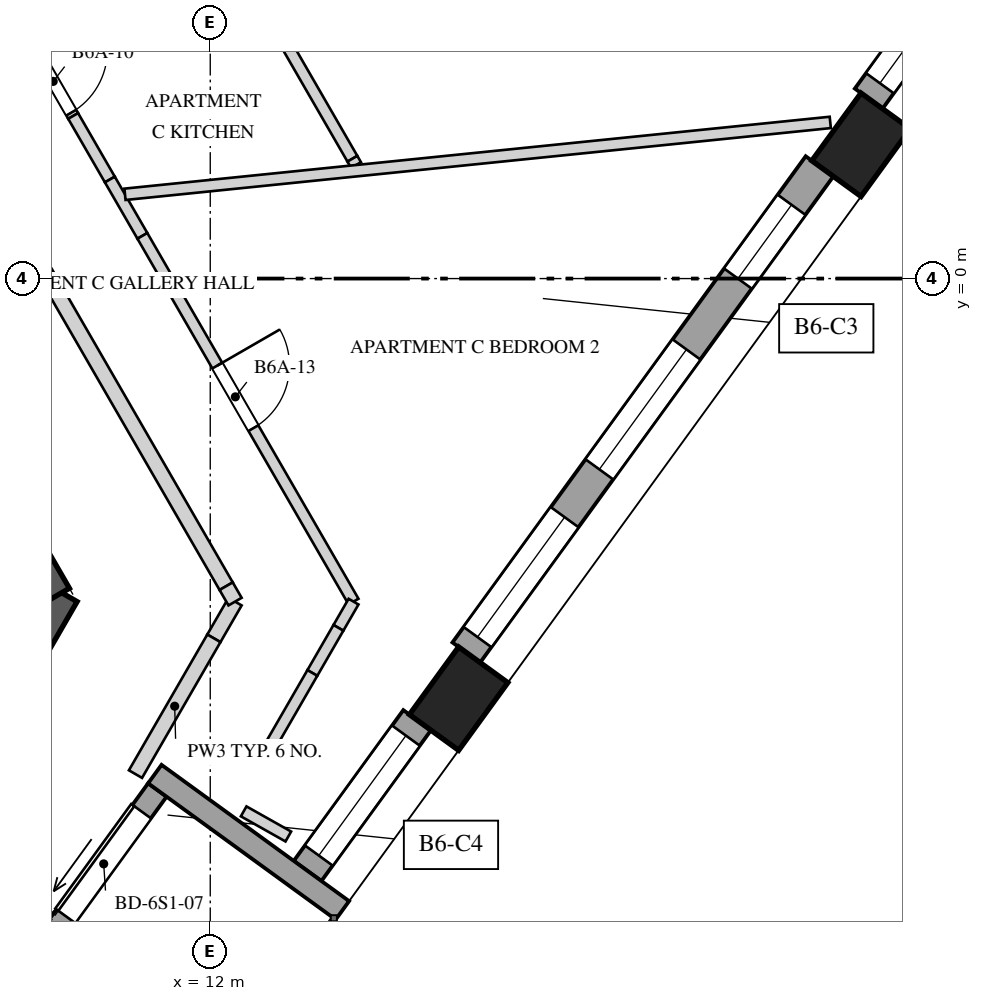
"""IFC4 building model, lengths in metres.
Left out: names, types, materials, properties, quantities, classifications, styles, units other than length and angle.
Written with IfcOpenShell. Run it as: python <this file> out.ifc"""

import sys

from ifc_helpers import new_model, si_unit, direction, frame, frame_2d, origin, origin_2d, place, context, subcontext, project, spatial, polyline, rectangle, outline, extrude, element, fill, save


model = new_model("IFC4")
c1 = context("Model", 3, precision=1e-05, world=origin(), true_north=direction((0.0, 1.0)))
c2 = subcontext(c1, "Body", "Model", "MODEL_VIEW")
j1 = project(units=[si_unit("LENGTHUNIT", "METRE"), si_unit("PLANEANGLEUNIT", "RADIAN")], contexts=[c1])
p1 = place(None, origin())
s1 = spatial("IfcSite", under=j1, at=p1, CompositionType="ELEMENT")
p2 = place(p1, origin())
s2 = spatial("IfcBuilding", under=s1, at=p2, CompositionType="ELEMENT")
p3 = place(p2, frame((0.0, 0.0, 241.2)))
s3 = spatial("IfcBuildingStorey", under=s2, at=p3, CompositionType="ELEMENT", Elevation=241.2)
p4 = place(p3, frame((8.501, -6.575, 0.0), z_axis=(0.0, 0.0, 1.0), x_axis=(0.499995765644, 0.866027848477, 0.0)))
e1 = element("IfcWall", 1, at=p4, inside=s3, PredefinedType="SHEAR", context=c2, shape_type="SweptSolid", body=[
    extrude(rectangle(XDim=2.887, YDim=0.7, at=frame_2d((1.443, 0.0))), origin(), (0.0, 0.0, 1.0), 4.0),
])
p5 = place(p3, frame((9.844, -4.25, 0.0), z_axis=(0.0, 0.0, 1.0), x_axis=(-0.500003331888, 0.866023480109, 0.0)))
e2 = element("IfcWall", 2, at=p5, inside=s3, PredefinedType="SHEAR", context=c2, shape_type="SweptSolid", body=[
    extrude(rectangle(XDim=17.205, YDim=0.7, at=frame_2d((8.603, 0.0))), origin(), (0.0, 0.0, 1.0), 4.0),
])
p6 = place(p5, frame((6.877, 0.0, 0.0)))
e3 = element("IfcOpeningElement", 3, at=p6, cuts=e2, PredefinedType="OPENING", context=c2, shape_type="SweptSolid", body=[
    extrude(rectangle(XDim=1.0, YDim=2.4, at=frame_2d((0.5, 1.2))), frame((0.0, 0.36, 0.0), z_axis=(0.0, -1.0, 0.0), x_axis=(1.0, 0.0, 0.0)), (0.0, 0.0, 1.0), 0.72),
])
for number, where, z_axis, x_axis in (
    (4, (15.268, -5.526, 0.0), (0.0, 0.0, 1.0), (0.588, 0.809, 0.0)),
    (5, (20.562, 1.76, 0.0), (0.0, 0.0, 1.0), (0.588, 0.809, 0.0)),
):
    element("IfcColumn", number, at=place(p3, frame(where, z_axis=z_axis, x_axis=x_axis)), inside=s3, PredefinedType="COLUMN", context=c2, shape_type="SweptSolid", body=[
        extrude(rectangle(XDim=1.1, YDim=0.8, at=origin_2d()), origin(), (0.0, 0.0, 1.0), 4.0),
    ])
p7 = place(p3, frame((13.281, -7.793, 0.0), z_axis=(0.0, 0.0, 1.0), x_axis=(0.587792773076, 0.809011530152, 0.0)))
e6 = element("IfcWall", 6, at=p7, inside=s3, PredefinedType="SOLIDWALL", context=c2, shape_type="SweptSolid", body=[
    extrude(rectangle(XDim=2.452, YDim=0.45, at=frame_2d((1.226, 0.0))), origin(), (0.0, 0.0, 1.0), 3.3),
])
p8 = place(p7, frame((0.251, 0.0, 0.4)))
e7 = element("IfcOpeningElement", 7, at=p8, cuts=e6, PredefinedType="OPENING", context=c2, shape_type="SweptSolid", body=[
    extrude(rectangle(XDim=1.95, YDim=2.75, at=frame_2d((0.975, 1.375))), frame((0.0, 0.235, 0.0), z_axis=(0.0, -1.0, 0.0), x_axis=(1.0, 0.0, 0.0)), (0.0, 0.0, 1.0), 0.47),
])
p9 = place(p3, frame((15.368, -4.92, 0.0), z_axis=(0.0, 0.0, 1.0), x_axis=(0.587782407267, 0.809019061399, 0.0)))
e8 = element("IfcWall", 8, at=p9, inside=s3, PredefinedType="SOLIDWALL", context=c2, shape_type="SweptSolid", body=[
    extrude(rectangle(XDim=7.907, YDim=0.45, at=frame_2d((3.953, 0.0))), origin(), (0.0, 0.0, 1.0), 3.3),
])
p10 = place(p9, frame((0.251, 0.0, 0.4)))
e9 = element("IfcOpeningElement", 9, at=p10, cuts=e8, PredefinedType="OPENING", context=c2, shape_type="SweptSolid", body=[
    extrude(rectangle(XDim=1.95, YDim=2.75, at=frame_2d((0.975, 1.375))), frame((0.0, 0.235, 0.0), z_axis=(0.0, -1.0, 0.0), x_axis=(1.0, 0.0, 0.0)), (0.0, 0.0, 1.0), 0.47),
])
p11 = place(p9, frame((2.978, 0.0, 0.4)))
e10 = element("IfcOpeningElement", 10, at=p11, cuts=e8, PredefinedType="OPENING", context=c2, shape_type="SweptSolid", body=[
    extrude(rectangle(XDim=1.95, YDim=2.75, at=frame_2d((0.975, 1.375))), frame((0.0, 0.235, 0.0), z_axis=(0.0, -1.0, 0.0), x_axis=(1.0, 0.0, 0.0)), (0.0, 0.0, 1.0), 0.47),
])
p12 = place(p9, frame((6.081, 0.0, 0.4)))
e11 = element("IfcOpeningElement", 11, at=p12, cuts=e8, PredefinedType="OPENING", context=c2, shape_type="SweptSolid", body=[
    extrude(rectangle(XDim=1.2, YDim=2.75, at=frame_2d((0.6, 1.375))), frame((0.0, 0.235, 0.0), z_axis=(0.0, -1.0, 0.0), x_axis=(1.0, 0.0, 0.0)), (0.0, 0.0, 1.0), 0.47),
])
p13 = place(p3, frame((20.662, 2.367, 0.0), z_axis=(0.0, 0.0, 1.0), x_axis=(0.587792773076, 0.809011530152, 0.0)))
e12 = element("IfcWall", 12, at=p13, inside=s3, PredefinedType="SOLIDWALL", context=c2, shape_type="SweptSolid", body=[
    extrude(rectangle(XDim=2.452, YDim=0.45, at=frame_2d((1.226, 0.0))), origin(), (0.0, 0.0, 1.0), 3.3),
])
p14 = place(p13, frame((0.251, 0.0, 0.4)))
e13 = element("IfcOpeningElement", 13, at=p14, cuts=e12, PredefinedType="OPENING", context=c2, shape_type="SweptSolid", body=[
    extrude(rectangle(XDim=1.95, YDim=2.75, at=frame_2d((0.975, 1.375))), frame((0.0, 0.235, 0.0), z_axis=(0.0, -1.0, 0.0), x_axis=(1.0, 0.0, 0.0)), (0.0, 0.0, 1.0), 0.47),
])
p15 = place(p3, frame((9.892, -8.672, 0.0), z_axis=(0.0, 0.0, 1.0), x_axis=(0.587833242688, 0.808982125137, 0.0)))
e14 = element("IfcWall", 14, at=p15, inside=s3, PredefinedType="SOLIDWALL", context=c2, shape_type="SweptSolid", body=[
    extrude(rectangle(XDim=2.402, YDim=0.3, at=frame_2d((1.201, 0.0))), origin(), (0.0, 0.0, 1.0), 3.3),
])
p16 = place(p15, frame((0.351, 0.0, 0.0)))
e15 = element("IfcOpeningElement", 15, at=p16, cuts=e14, PredefinedType="OPENING", context=c2, shape_type="SweptSolid", body=[
    extrude(rectangle(XDim=1.7, YDim=2.5, at=frame_2d((0.85, 1.25))), frame((0.0, 0.16, 0.0), z_axis=(0.0, -1.0, 0.0), x_axis=(1.0, 0.0, 0.0)), (0.0, 0.0, 1.0), 0.32),
])
p17 = place(p3, frame((13.739, -8.312, 0.0), z_axis=(0.0, 0.0, 1.0), x_axis=(-0.80902328748, 0.587776590479, 0.0)))
e16 = element("IfcWall", 16, at=p17, inside=s3, PredefinedType="SOLIDWALL", context=c2, shape_type="SweptSolid", body=[
    extrude(rectangle(XDim=3.05, YDim=0.3, at=frame_2d((1.525, 0.0))), origin(), (0.0, 0.0, 1.0), 3.3),
])
p18 = place(p3, frame((9.321, 3.655, 0.0), z_axis=(0.0, 0.0, 1.0), x_axis=(0.499980071345, -0.866036909293, 0.0)))
e17 = element("IfcWall", 17, at=p18, inside=s3, PredefinedType="PARTITIONING", context=c2, shape_type="SweptSolid", body=[
    extrude(outline(polyline([(0.0, 0.0), (1.75, 0.0), (1.75, 3.65), (0.892, 3.65), (0.892, 2.55), (0.0, 2.55), (0.0, 0.0)])), frame((0.0, 0.075, 0.0), z_axis=(0.0, -1.0, 0.0), x_axis=(1.0, 0.0, 0.0)), (0.0, 0.0, 1.0), 0.15),
])
p19 = place(p18, frame((0.75, 0.0, 0.0)))
e18 = element("IfcOpeningElement", 18, at=p19, cuts=e17, PredefinedType="OPENING", context=c2, shape_type="SweptSolid", body=[
    extrude(rectangle(XDim=0.95, YDim=2.4, at=frame_2d((0.475, 1.2))), frame((0.0, 0.085, 0.0), z_axis=(0.0, -1.0, 0.0), x_axis=(1.0, 0.0, 0.0)), (0.0, 0.0, 1.0), 0.17),
])
p20 = place(p3, frame((10.196, 2.139, 0.0), z_axis=(0.0, 0.0, 1.0), x_axis=(0.500109093648, -0.865962409375, 0.0)))
e19 = element("IfcWall", 19, at=p20, inside=s3, PredefinedType="PARTITIONING", context=c2, shape_type="SweptSolid", body=[
    extrude(rectangle(XDim=0.966, YDim=0.15, at=frame_2d((0.483, 0.0))), origin(), (0.0, 0.0, 1.0), 3.65),
])
p21 = place(p3, frame((10.679, 1.303, 0.0), z_axis=(0.0, 0.0, 1.0), x_axis=(0.500035209441, -0.86600507465, 0.0)))
e20 = element("IfcWall", 20, at=p21, inside=s3, PredefinedType="PARTITIONING", context=c2, shape_type="SweptSolid", body=[
    extrude(rectangle(XDim=0.856, YDim=0.15, at=frame_2d((0.428, 0.0))), origin(), (0.0, 0.0, 1.0), 2.75),
])
p22 = place(p3, frame((11.107, 0.562, 0.0), z_axis=(0.0, 0.0, 1.0), x_axis=(0.499981090573, -0.866036320872, 0.0)))
e21 = element("IfcWall", 21, at=p22, inside=s3, PredefinedType="PARTITIONING", context=c2, shape_type="SweptSolid", body=[
    extrude(rectangle(XDim=5.556, YDim=0.15, at=frame_2d((2.778, 0.0))), origin(), (0.0, 0.0, 1.0), 3.65),
])
p23 = place(p22, frame((1.971, 0.0, 0.0)))
e22 = element("IfcOpeningElement", 22, at=p23, cuts=e21, PredefinedType="OPENING", context=c2, shape_type="SweptSolid", body=[
    extrude(rectangle(XDim=0.95, YDim=2.4, at=frame_2d((0.475, 1.2))), frame((0.0, 0.085, 0.0), z_axis=(0.0, -1.0, 0.0), x_axis=(1.0, 0.0, 0.0)), (0.0, 0.0, 1.0), 0.17),
])
p24 = place(p3, frame((12.563, 3.84, 0.0), z_axis=(0.0, 0.0, 1.0), x_axis=(0.500016176693, -0.866016063965, 0.0)))
e23 = element("IfcWall", 23, at=p24, inside=s3, PredefinedType="PARTITIONING", context=c2, shape_type="SweptSolid", body=[
    extrude(rectangle(XDim=2.614, YDim=0.15, at=frame_2d((1.307, 0.0))), origin(), (0.0, 0.0, 1.0), 3.65),
])
p25 = place(p3, frame((13.87, 1.576, 0.0), z_axis=(0.0, 0.0, 1.0), x_axis=(0.49972245349, -0.866185586049, 0.0)))
e24 = element("IfcWall", 24, at=p25, inside=s3, PredefinedType="PARTITIONING", context=c2, shape_type="SweptSolid", body=[
    extrude(rectangle(XDim=0.095, YDim=0.15, at=frame_2d((0.048, 0.0))), origin(), (0.0, 0.0, 1.0), 2.75),
])
p26 = place(p3, frame((12.44, -7.009, 0.0), z_axis=(0.0, 0.0, 1.0), x_axis=(0.871323961853, -0.490708216256, 0.0)))
e25 = element("IfcWall", 25, at=p26, inside=s3, PredefinedType="PARTITIONING", context=c2, shape_type="SweptSolid", body=[
    extrude(rectangle(XDim=0.674, YDim=0.15, at=frame_2d((0.337, 0.0))), origin(), (0.0, 0.0, 1.0), 3.65),
])
p27 = place(p3, frame((13.885, -4.25, 0.0), z_axis=(0.0, 0.0, 1.0), x_axis=(-0.499899443193, -0.866083452501, 0.0)))
e26 = element("IfcWall", 26, at=p27, inside=s3, PredefinedType="PARTITIONING", context=c2, shape_type="SweptSolid", body=[
    extrude(rectangle(XDim=0.398, YDim=0.15, at=frame_2d((0.199, 0.0))), origin(), (0.0, 0.0, 1.0), 3.65),
])
p28 = place(p3, frame((13.686, -4.595, 0.0), z_axis=(0.0, 0.0, 1.0), x_axis=(-0.500081895979, -0.865978115955, 0.0)))
e27 = element("IfcWall", 27, at=p28, inside=s3, PredefinedType="PARTITIONING", context=c2, shape_type="SweptSolid", body=[
    extrude(rectangle(XDim=0.686, YDim=0.15, at=frame_2d((0.343, 0.0))), origin(), (0.0, 0.0, 1.0), 2.95),
])
p29 = place(p3, frame((13.343, -5.189, 0.0), z_axis=(0.0, 0.0, 1.0), x_axis=(-0.500009088543, -0.866020156448, 0.0)))
e28 = element("IfcWall", 28, at=p29, inside=s3, PredefinedType="PARTITIONING", context=c2, shape_type="SweptSolid", body=[
    extrude(rectangle(XDim=1.106, YDim=0.15, at=frame_2d((0.553, 0.0))), origin(), (0.0, 0.0, 1.0), 3.65),
])
p30 = place(p3, frame((20.157, 2.054, 0.0), z_axis=(0.0, 0.0, 1.0), x_axis=(-0.994848051669, -0.101377285871, 0.0)))
e29 = element("IfcWall", 29, at=p30, inside=s3, PredefinedType="PARTITIONING", context=c2, shape_type="SweptSolid", body=[
    extrude(rectangle(XDim=9.327, YDim=0.15, at=frame_2d((4.664, 0.0))), origin(), (0.0, 0.0, 1.0), 2.75),
])
p31 = place(p3, frame((12.326, -4.25, 0.0), z_axis=(0.0, 0.0, 1.0), x_axis=(-0.500000383388, -0.866025182435, 0.0)))
e30 = element("IfcWall", 30, at=p31, inside=s3, PredefinedType="SOLIDWALL", context=c2, shape_type="SweptSolid", body=[
    extrude(rectangle(XDim=0.558, YDim=0.2, at=frame_2d((0.279, 0.0))), origin(), (0.0, 0.0, 1.0), 2.95),
])
p32 = place(p3, frame((12.048, -4.733, 0.0), z_axis=(0.0, 0.0, 1.0), x_axis=(-0.499958106649, -0.866049589571, 0.0)))
e31 = element("IfcWall", 31, at=p32, inside=s3, PredefinedType="SOLIDWALL", context=c2, shape_type="SweptSolid", body=[
    extrude(rectangle(XDim=2.063, YDim=0.2, at=frame_2d((1.031, 0.0))), origin(), (0.0, 0.0, 1.0), 3.65),
])
p33 = place(p3, frame((9.629, 0.423, 0.0), z_axis=(0.0, 0.0, 1.0), x_axis=(0.499995433041, -0.866028040503, 0.0)))
e32 = element("IfcWall", 32, at=p33, inside=s3, PredefinedType="SOLIDWALL", context=c2, shape_type="SweptSolid", body=[
    extrude(rectangle(XDim=5.161, YDim=0.2, at=frame_2d((2.581, 0.0))), origin(), (0.0, 0.0, 1.0), 3.65),
])
p34 = place(p3, frame((12.209, -4.047, 0.0), z_axis=(0.0, 0.0, 1.0), x_axis=(0.49972245349, -0.866185586049, 0.0)))
e33 = element("IfcWall", 33, at=p34, inside=s3, PredefinedType="SOLIDWALL", context=c2, shape_type="SweptSolid", body=[
    extrude(rectangle(XDim=0.235, YDim=0.2, at=frame_2d((0.117, 0.0))), origin(), (0.0, 0.0, 1.0), 2.95),
])
p35 = place(p8, origin())
e34 = element("IfcWindow", 34, at=p35, inside=s3, PartitioningType="SINGLE_PANEL", PredefinedType="WINDOW", context=c2, shape_type="SweptSolid", body=[
    extrude(rectangle(XDim=1.95, YDim=2.75, at=frame_2d((0.975, 1.375))), frame((0.0, 0.03, 0.0), z_axis=(0.0, -1.0, 0.0), x_axis=(1.0, 0.0, 0.0)), (0.0, 0.0, 1.0), 0.06),
])
fill(e7, e34)
p36 = place(p10, origin())
e35 = element("IfcWindow", 35, at=p36, inside=s3, PartitioningType="SINGLE_PANEL", PredefinedType="WINDOW", context=c2, shape_type="SweptSolid", body=[
    extrude(rectangle(XDim=1.95, YDim=2.75, at=frame_2d((0.975, 1.375))), frame((0.0, 0.03, 0.0), z_axis=(0.0, -1.0, 0.0), x_axis=(1.0, 0.0, 0.0)), (0.0, 0.0, 1.0), 0.06),
])
fill(e9, e35)
p37 = place(p11, origin())
e36 = element("IfcWindow", 36, at=p37, inside=s3, PartitioningType="SINGLE_PANEL", PredefinedType="WINDOW", context=c2, shape_type="SweptSolid", body=[
    extrude(rectangle(XDim=1.95, YDim=2.75, at=frame_2d((0.975, 1.375))), frame((0.0, 0.03, 0.0), z_axis=(0.0, -1.0, 0.0), x_axis=(1.0, 0.0, 0.0)), (0.0, 0.0, 1.0), 0.06),
])
fill(e10, e36)
p38 = place(p12, origin())
e37 = element("IfcWindow", 37, at=p38, inside=s3, PartitioningType="SINGLE_PANEL", PredefinedType="WINDOW", context=c2, shape_type="SweptSolid", body=[
    extrude(rectangle(XDim=1.2, YDim=2.75, at=frame_2d((0.6, 1.375))), frame((0.0, 0.03, 0.0), z_axis=(0.0, -1.0, 0.0), x_axis=(1.0, 0.0, 0.0)), (0.0, 0.0, 1.0), 0.06),
])
fill(e11, e37)
p39 = place(p14, origin())
e38 = element("IfcWindow", 38, at=p39, inside=s3, PartitioningType="SINGLE_PANEL", PredefinedType="WINDOW", context=c2, shape_type="SweptSolid", body=[
    extrude(rectangle(XDim=1.95, YDim=2.75, at=frame_2d((0.975, 1.375))), frame((0.0, 0.03, 0.0), z_axis=(0.0, -1.0, 0.0), x_axis=(1.0, 0.0, 0.0)), (0.0, 0.0, 1.0), 0.06),
])
fill(e13, e38)
p40 = place(p16, origin())
e39 = element("IfcDoor", 39, at=p40, inside=s3, OperationType="SLIDING_TO_LEFT", PredefinedType="DOOR", context=c2, shape_type="SweptSolid", body=[
    extrude(rectangle(XDim=1.7, YDim=2.5, at=frame_2d((0.85, 1.25))), frame((0.0, 0.025, 0.0), z_axis=(0.0, -1.0, 0.0), x_axis=(1.0, 0.0, 0.0)), (0.0, 0.0, 1.0), 0.05),
])
fill(e15, e39)
p41 = place(p19, origin())
e40 = element("IfcDoor", 40, at=p41, inside=s3, OperationType="SINGLE_SWING_RIGHT", PredefinedType="DOOR", context=c2, shape_type="SweptSolid", body=[
    extrude(rectangle(XDim=0.95, YDim=2.4, at=frame_2d((0.475, 1.2))), frame((0.0, 0.025, 0.0), z_axis=(0.0, -1.0, 0.0), x_axis=(1.0, 0.0, 0.0)), (0.0, 0.0, 1.0), 0.05),
])
fill(e18, e40)
p42 = place(p23, origin())
e41 = element("IfcDoor", 41, at=p42, inside=s3, OperationType="SINGLE_SWING_LEFT", PredefinedType="DOOR", context=c2, shape_type="SweptSolid", body=[
    extrude(rectangle(XDim=0.95, YDim=2.4, at=frame_2d((0.475, 1.2))), frame((0.0, 0.025, 0.0), z_axis=(0.0, -1.0, 0.0), x_axis=(1.0, 0.0, 0.0)), (0.0, 0.0, 1.0), 0.05),
])
fill(e22, e41)
save(model, sys.argv[1])
